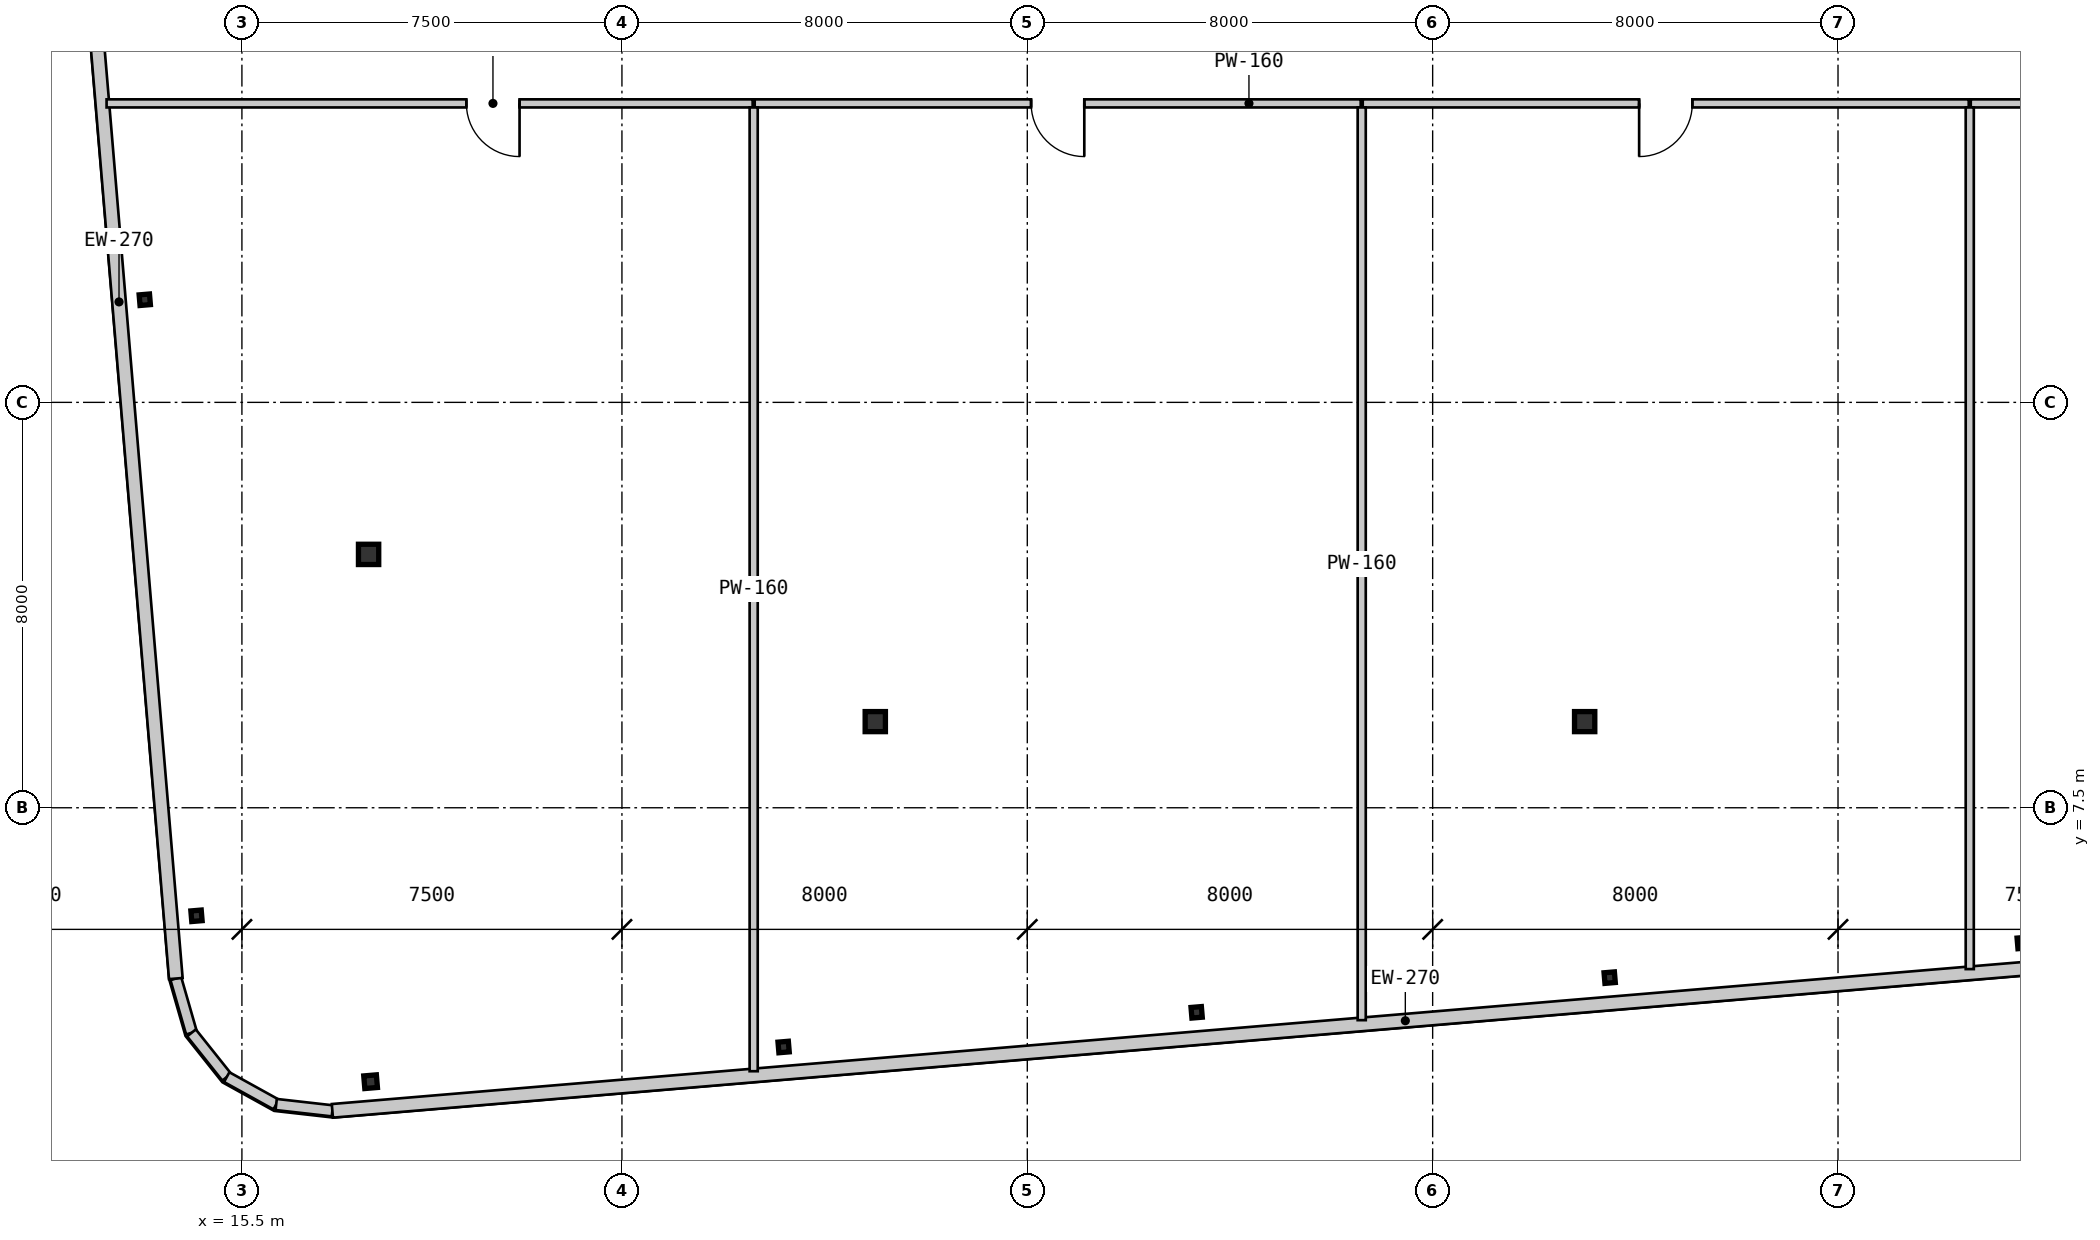
"""IFC4 building model, lengths in metres.
Left out: names, types, materials, properties, quantities, classifications, styles, units other than length and angle.
Written with IfcOpenShell. Run it as: python <this file> out.ifc"""

import sys

from ifc_helpers import new_model, si_unit, direction, frame, frame_2d, origin, origin_2d, place, context, subcontext, project, spatial, rectangle, hollow_rectangle, i_section, extrude, source, transform, mapped, element, fill, save


model = new_model("IFC4")
c1 = context("Model", 3, precision=1e-05, world=origin(), true_north=direction((0.0, 1.0)))
c2 = subcontext(c1, "Body", "Model", "MODEL_VIEW")
j1 = project(units=[si_unit("LENGTHUNIT", "METRE"), si_unit("PLANEANGLEUNIT", "RADIAN")], contexts=[c1])
p1 = place(None, origin())
s1 = spatial("IfcSite", under=j1, at=p1, CompositionType="ELEMENT")
p2 = place(p1, origin())
s2 = spatial("IfcBuilding", under=s1, at=p2, CompositionType="ELEMENT")
p3 = place(p2, frame((0.0, 0.0, 207.2)))
s3 = spatial("IfcBuildingStorey", under=s2, at=p3, CompositionType="ELEMENT", Elevation=207.2)
m1 = source(origin(), c2, "Body", "SweptSolid", [
    extrude(i_section(OverallWidth=0.4, OverallDepth=0.396, WebThickness=0.022, FlangeThickness=0.034, at=origin_2d()), origin(), (0.0, 0.0, 1.0), 4.2),
])
for number, where, z_axis, x_axis in (
    (1, (28.0, 9.2, 0.0), (0.0, 0.0, 1.0), (1.0, 0.0, 0.0)),
    (2, (42.0, 9.2, 0.0), (0.0, 0.0, 1.0), (1.0, 0.0, 0.0)),
):
    element("IfcColumn", number, at=place(p3, frame(where, z_axis=z_axis, x_axis=x_axis)), inside=s3, PredefinedType="COLUMN", context=c2, shape_type="MappedRepresentation", body=[
        mapped(m1, transform((0.0, 0.0, 0.0), scale=1.0)),
    ])
m2 = source(origin(), c2, "Body", "SweptSolid", [
    extrude(hollow_rectangle(XDim=0.4, YDim=0.4, WallThickness=0.016, at=origin_2d()), origin(), (0.0, 0.0, 1.0), 4.2),
])
p4 = place(p3, frame((18.0, 12.5, 0.0), z_axis=(0.0, 0.0, 1.0), x_axis=(1.0, 0.0, 0.0)))
e3 = element("IfcColumn", 3, at=p4, inside=s3, PredefinedType="COLUMN", context=c2, shape_type="MappedRepresentation", body=[
    mapped(m2, transform((0.0, 0.0, 0.0), scale=1.0)),
])
m3 = source(origin(), c2, "Body", "SweptSolid", [
    extrude(hollow_rectangle(XDim=0.25, YDim=0.25, WallThickness=0.01, at=origin_2d()), origin(), (0.0, 0.0, 1.0), 4.2),
])
p5 = place(p3, frame((18.04, 2.094, 0.0), z_axis=(0.0, 0.0, 1.0), x_axis=(0.99649285925, 0.083677843332, 0.0)))
e4 = element("IfcColumn", 4, at=p5, inside=s3, PredefinedType="COLUMN", context=c2, shape_type="MappedRepresentation", body=[
    mapped(m3, transform((0.0, 0.0, 0.0), scale=1.0)),
])
m4 = source(origin(), c2, "Body", "SweptSolid", [
    extrude(i_section(OverallWidth=0.205, OverallDepth=0.21, WebThickness=0.009, FlangeThickness=0.014, at=origin_2d()), origin(), (0.0, 0.0, 1.0), 4.2),
])
for number, where, z_axis, x_axis in (
    (5, (26.191, 2.779, 0.0), (0.0, 0.0, 1.0), (0.996, 0.084, 0.0)),
    (6, (34.342, 3.463, 0.0), (0.0, 0.0, 1.0), (0.996, 0.084, 0.0)),
    (7, (42.494, 4.147, 0.0), (0.0, 0.0, 1.0), (0.996, 0.084, 0.0)),
    (8, (50.645, 4.832, 0.0), (0.0, 0.0, 1.0), (0.996, 0.084, 0.0)),
    (9, (14.604, 5.368, 0.0), (0.0, 0.0, 1.0), (0.996, 0.084, 0.0)),
    (10, (13.583, 17.525, 0.0), (0.0, 0.0, 1.0), (0.996, 0.084, 0.0)),
):
    element("IfcColumn", number, at=place(p3, frame(where, z_axis=z_axis, x_axis=x_axis)), inside=s3, PredefinedType="COLUMN", context=c2, shape_type="MappedRepresentation", body=[
        mapped(m4, transform((0.0, 0.0, 0.0), scale=1.0)),
    ])
m5 = source(origin(), c2, "Body", "SweptSolid", [
    extrude(rectangle(XDim=1.116, YDim=0.22, at=frame_2d((0.558, 0.0))), origin(), (0.0, 0.0, 1.0), 3.78),
])
for number, where, z_axis, x_axis in (
    (11, (14.196, 4.13, 0.0), (0.0, 0.0, 1.0), (0.277, -0.961, 0.0)),
    (12, (14.504, 3.057, 0.0), (0.0, 0.0, 1.0), (0.623, -0.782, 0.0)),
    (13, (15.2, 2.184, 0.0), (0.0, 0.0, 1.0), (0.875, -0.484, 0.0)),
    (14, (16.176, 1.644, 0.0), (0.0, 0.0, 1.0), (0.994, -0.112, 0.0)),
):
    element("IfcWall", number, at=place(p3, frame(where, z_axis=z_axis, x_axis=x_axis)), inside=s3, PredefinedType="SOLIDWALL", context=c2, shape_type="MappedRepresentation", body=[
        mapped(m5, transform((0.0, 0.0, 0.0), scale=1.0)),
    ])
m6 = source(origin(), c2, "Body", "SweptSolid", [
    extrude(rectangle(XDim=37.323, YDim=0.27, at=frame_2d((18.661, 0.0))), origin(), (0.0, 0.0, 1.0), 3.78),
])
p6 = place(p3, frame((17.285, 1.519, 0.0), z_axis=(0.0, 0.0, 1.0), x_axis=(0.99649291123, 0.083677224315, 0.0)))
e15 = element("IfcWall", 15, at=p6, inside=s3, PredefinedType="SOLIDWALL", context=c2, shape_type="MappedRepresentation", body=[
    mapped(m6, transform((0.0, 0.0, 0.0), scale=1.0)),
])
m7 = source(origin(), c2, "Body", "SweptSolid", [
    extrude(rectangle(XDim=26.8, YDim=0.27, at=frame_2d((13.4, 0.0))), origin(), (0.0, 0.0, 1.0), 3.78),
])
p7 = place(p3, frame((11.953, 30.835, 0.0), z_axis=(0.0, 0.0, 1.0), x_axis=(0.083673473834, -0.996493226157, 0.0)))
e16 = element("IfcWall", 16, at=p7, inside=s3, PredefinedType="SOLIDWALL", context=c2, shape_type="MappedRepresentation", body=[
    mapped(m7, transform((0.0, 0.0, 0.0), scale=1.0)),
])
m8 = source(origin(), c2, "Body", "SweptSolid", [
    extrude(rectangle(XDim=0.9, YDim=1.5, at=frame_2d((0.45, 0.75))), frame((0.0, 0.145, 0.0), z_axis=(0.0, -1.0, 0.0), x_axis=(1.0, 0.0, 0.0)), (0.0, 0.0, 1.0), 0.29),
])
p8 = place(p7, frame((1.5, 0.0, 0.7)))
e17 = element("IfcOpeningElement", 17, at=p8, cuts=e16, PredefinedType="OPENING", context=c2, shape_type="MappedRepresentation", body=[
    mapped(m8, transform((0.0, 0.0, 0.0), scale=1.0)),
])
m9 = source(origin(), c2, "Body", "SweptSolid", [
    extrude(rectangle(XDim=12.751, YDim=0.16, at=frame_2d((6.375, 0.0))), origin(), (0.0, 0.0, 1.0), 3.78),
])
p9 = place(p3, frame((25.58, 21.4, 0.0), z_axis=(0.0, 0.0, 1.0), x_axis=(-1.0, 0.0, 0.0)))
e18 = element("IfcWall", 18, at=p9, inside=s3, PredefinedType="PARTITIONING", context=c2, shape_type="MappedRepresentation", body=[
    mapped(m9, transform((0.0, 0.0, 0.0), scale=1.0)),
])
m10 = source(origin(), c2, "Body", "SweptSolid", [
    extrude(rectangle(XDim=1.05, YDim=2.1, at=frame_2d((0.525, 1.05))), frame((0.0, 0.09, 0.0), z_axis=(0.0, -1.0, 0.0), x_axis=(1.0, 0.0, 0.0)), (0.0, 0.0, 1.0), 0.18),
])
p10 = place(p9, frame((4.6, 0.0, 0.0)))
e19 = element("IfcOpeningElement", 19, at=p10, cuts=e18, PredefinedType="OPENING", context=c2, shape_type="MappedRepresentation", body=[
    mapped(m10, transform((0.0, 0.0, 0.0), scale=1.0)),
])
m11 = source(origin(), c2, "Body", "SweptSolid", [
    extrude(rectangle(XDim=11.96, YDim=0.16, at=frame_2d((5.98, 0.0))), origin(), (0.0, 0.0, 1.0), 3.78),
])
p11 = place(p3, frame((37.58, 21.4, 0.0), z_axis=(0.0, 0.0, 1.0), x_axis=(-1.0, 0.0, 0.0)))
e20 = element("IfcWall", 20, at=p11, inside=s3, PredefinedType="PARTITIONING", context=c2, shape_type="MappedRepresentation", body=[
    mapped(m11, transform((0.0, 0.0, 0.0), scale=1.0)),
])
p12 = place(p11, frame((5.455, 0.0, 0.0)))
e21 = element("IfcOpeningElement", 21, at=p12, cuts=e20, PredefinedType="OPENING", context=c2, shape_type="MappedRepresentation", body=[
    mapped(m10, transform((0.0, 0.0, 0.0), scale=1.0)),
])
p13 = place(p3, frame((49.58, 21.4, 0.0), z_axis=(0.0, 0.0, 1.0), x_axis=(-1.0, 0.0, 0.0)))
e22 = element("IfcWall", 22, at=p13, inside=s3, PredefinedType="PARTITIONING", context=c2, shape_type="MappedRepresentation", body=[
    mapped(m11, transform((0.0, 0.0, 0.0), scale=1.0)),
])
p14 = place(p13, frame((5.455, 0.0, 0.0)))
e23 = element("IfcOpeningElement", 23, at=p14, cuts=e22, PredefinedType="OPENING", context=c2, shape_type="MappedRepresentation", body=[
    mapped(m10, transform((0.0, 0.0, 0.0), scale=1.0)),
])
m12 = source(origin(), c2, "Body", "SweptSolid", [
    extrude(rectangle(XDim=8.3, YDim=0.16, at=frame_2d((4.15, 0.0))), origin(), (0.0, 0.0, 1.0), 3.78),
])
p15 = place(p3, frame((57.92, 21.4, 0.0), z_axis=(0.0, 0.0, 1.0), x_axis=(-1.0, 0.0, 0.0)))
e24 = element("IfcWall", 24, at=p15, inside=s3, PredefinedType="PARTITIONING", context=c2, shape_type="MappedRepresentation", body=[
    mapped(m12, transform((0.0, 0.0, 0.0), scale=1.0)),
])
p16 = place(p15, frame((3.625, 0.0, 0.0)))
e25 = element("IfcOpeningElement", 25, at=p16, cuts=e24, PredefinedType="OPENING", context=c2, shape_type="MappedRepresentation", body=[
    mapped(m10, transform((0.0, 0.0, 0.0), scale=1.0)),
])
m13 = source(origin(), c2, "Body", "SweptSolid", [
    extrude(rectangle(XDim=19.019, YDim=0.16, at=frame_2d((9.51, 0.0))), origin(), (0.0, 0.0, 1.0), 3.78),
])
p17 = place(p3, frame((25.6, 21.32, 0.0), z_axis=(0.0, 0.0, 1.0), x_axis=(0.0, -1.0, 0.0)))
e26 = element("IfcWall", 26, at=p17, inside=s3, PredefinedType="PARTITIONING", context=c2, shape_type="MappedRepresentation", body=[
    mapped(m13, transform((0.0, 0.0, 0.0), scale=1.0)),
])
m14 = source(origin(), c2, "Body", "SweptSolid", [
    extrude(rectangle(XDim=18.012, YDim=0.16, at=frame_2d((9.006, 0.0))), origin(), (0.0, 0.0, 1.0), 3.78),
])
p18 = place(p3, frame((37.6, 21.32, 0.0), z_axis=(0.0, 0.0, 1.0), x_axis=(0.0, -1.0, 0.0)))
e27 = element("IfcWall", 27, at=p18, inside=s3, PredefinedType="PARTITIONING", context=c2, shape_type="MappedRepresentation", body=[
    mapped(m14, transform((0.0, 0.0, 0.0), scale=1.0)),
])
m15 = source(origin(), c2, "Body", "SweptSolid", [
    extrude(rectangle(XDim=17.004, YDim=0.16, at=frame_2d((8.502, 0.0))), origin(), (0.0, 0.0, 1.0), 3.78),
])
p19 = place(p3, frame((49.6, 21.32, 0.0), z_axis=(0.0, 0.0, 1.0), x_axis=(0.0, -1.0, 0.0)))
e28 = element("IfcWall", 28, at=p19, inside=s3, PredefinedType="PARTITIONING", context=c2, shape_type="MappedRepresentation", body=[
    mapped(m15, transform((0.0, 0.0, 0.0), scale=1.0)),
])
m16 = source(origin(), c2, "Body", "SweptSolid", [
    extrude(rectangle(XDim=1.05, YDim=2.1, at=frame_2d((0.525, 1.05))), frame((0.0, 0.025, 0.0), z_axis=(0.0, -1.0, 0.0), x_axis=(1.0, 0.0, 0.0)), (0.0, 0.0, 1.0), 0.05),
])
p20 = place(p10, origin())
e29 = element("IfcDoor", 29, at=p20, inside=s3, OperationType="SINGLE_SWING_LEFT", PredefinedType="DOOR", context=c2, shape_type="MappedRepresentation", body=[
    mapped(m16, transform((0.0, 0.0, 0.0), scale=1.0)),
])
fill(e19, e29)
p21 = place(p12, origin())
e30 = element("IfcDoor", 30, at=p21, inside=s3, OperationType="SINGLE_SWING_LEFT", PredefinedType="DOOR", context=c2, shape_type="MappedRepresentation", body=[
    mapped(m16, transform((0.0, 0.0, 0.0), scale=1.0)),
])
fill(e21, e30)
p22 = place(p14, origin())
e31 = element("IfcDoor", 31, at=p22, inside=s3, OperationType="SINGLE_SWING_RIGHT", PredefinedType="DOOR", context=c2, shape_type="MappedRepresentation", body=[
    mapped(m16, transform((0.0, 0.0, 0.0), scale=1.0)),
])
fill(e23, e31)
save(model, sys.argv[1])
